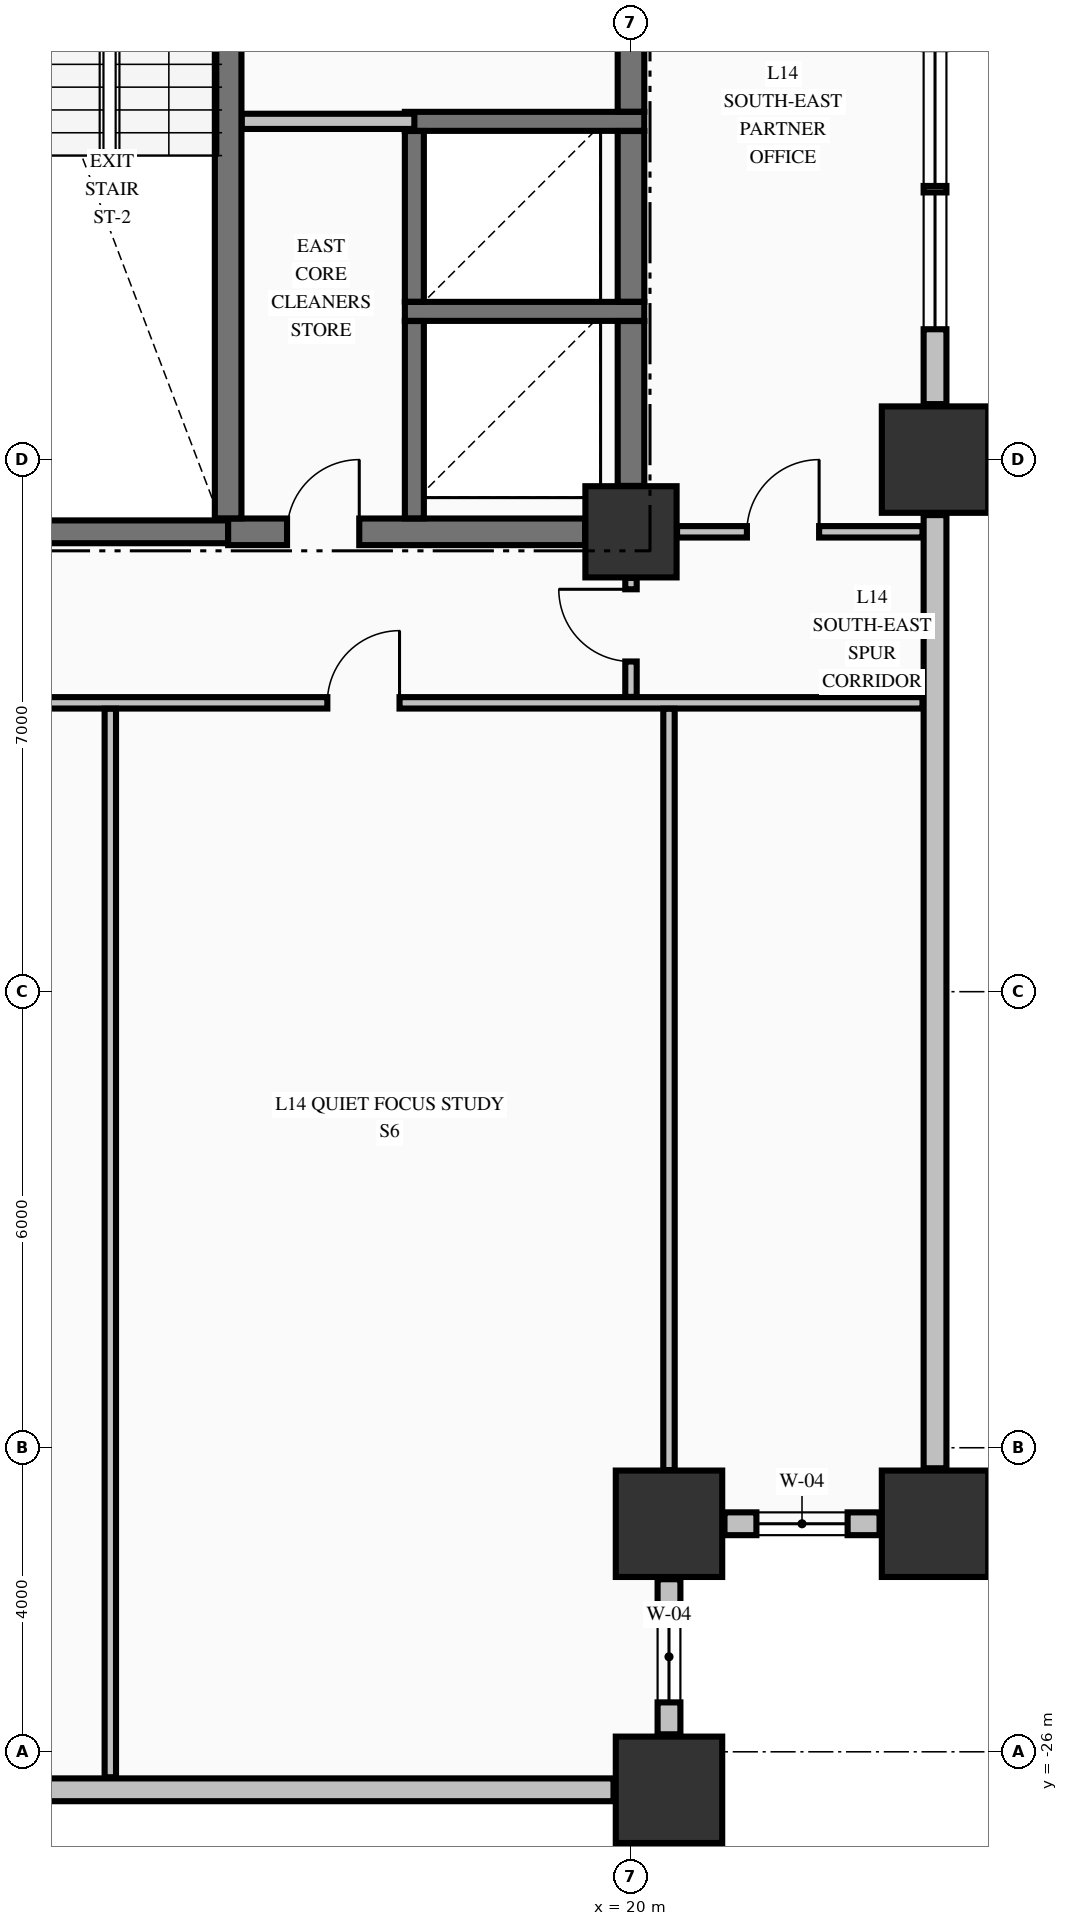
"""IFC4 building model, lengths in metres.
Left out: names, types, materials, properties, quantities, classifications, styles, units other than length and angle.
Written with IfcOpenShell. Run it as: python <this file> out.ifc"""

import sys

from ifc_helpers import new_model, si_unit, direction, frame, frame_2d, origin, origin_2d, place, context, subcontext, project, spatial, rectangle, extrude, element, fill, save


model = new_model("IFC4")
c1 = context("Model", 3, precision=1e-05, world=origin(), true_north=direction((0.0, 1.0)))
c2 = subcontext(c1, "Body", "Model", "MODEL_VIEW")
j1 = project(units=[si_unit("LENGTHUNIT", "METRE"), si_unit("PLANEANGLEUNIT", "RADIAN")], contexts=[c1])
p1 = place(None, origin())
s1 = spatial("IfcSite", under=j1, at=p1, CompositionType="ELEMENT")
p2 = place(p1, origin())
s2 = spatial("IfcBuilding", under=s1, at=p2, CompositionType="ELEMENT")
p3 = place(p2, frame((0.0, 0.0, 60.76)))
s3 = spatial("IfcBuildingStorey", under=s2, at=p3, CompositionType="ELEMENT", Elevation=60.76)
for number, where, z_axis, x_axis in (
    (1, (20.5, -26.5, -0.3), (0.0, 0.0, 1.0), (1.0, 0.0, 0.0)),
    (2, (24.0, -23.0, -0.3), (0.0, 0.0, 1.0), (1.0, 0.0, 0.0)),
    (3, (24.0, -9.0, -0.3), (0.0, 0.0, 1.0), (1.0, 0.0, 0.0)),
    (4, (20.5, -23.0, -0.3), (0.0, 0.0, 1.0), (1.0, 0.0, 0.0)),
):
    element("IfcColumn", number, at=place(p3, frame(where, z_axis=z_axis, x_axis=x_axis)), inside=s3, PredefinedType="COLUMN", context=c2, shape_type="SweptSolid", body=[
        extrude(rectangle(XDim=1.4, YDim=1.4, at=origin_2d()), origin(), (0.0, 0.0, 1.0), 3.62),
    ])
p4 = place(p3, frame((20.0, -9.95, -0.3), z_axis=(0.0, 0.0, 1.0), x_axis=(1.0, 0.0, 0.0)))
e5 = element("IfcColumn", 5, at=p4, inside=s3, PredefinedType="COLUMN", context=c2, shape_type="SweptSolid", body=[
    extrude(rectangle(XDim=1.2, YDim=1.2, at=origin_2d()), origin(), (0.0, 0.0, 1.0), 3.62),
])
p5 = place(p3, frame((20.5, -25.77, 0.0), z_axis=(0.0, 0.0, 1.0), x_axis=(0.0, 1.0, 0.0)))
e6 = element("IfcWall", 6, at=p5, inside=s3, PredefinedType="STANDARD", context=c2, shape_type="SweptSolid", body=[
    extrude(rectangle(XDim=2.04, YDim=0.3, at=frame_2d((1.02, 0.0))), origin(), (0.0, 0.0, 1.0), 2.712),
])
p6 = place(p5, frame((0.42, 0.0, 0.82)))
e7 = element("IfcOpeningElement", 7, at=p6, cuts=e6, PredefinedType="OPENING", context=c2, shape_type="SweptSolid", body=[
    extrude(rectangle(XDim=1.2, YDim=1.65, at=frame_2d((0.6, 0.825))), frame((0.0, 0.16, 0.0), z_axis=(0.0, -1.0, 0.0), x_axis=(1.0, 0.0, 0.0)), (0.0, 0.0, 1.0), 0.32),
])
p7 = place(p3, frame((21.23, -23.0, 0.0), z_axis=(0.0, 0.0, 1.0), x_axis=(1.0, 0.0, 0.0)))
e8 = element("IfcWall", 8, at=p7, inside=s3, PredefinedType="STANDARD", context=c2, shape_type="SweptSolid", body=[
    extrude(rectangle(XDim=2.04, YDim=0.3, at=frame_2d((1.02, 0.0))), origin(), (0.0, 0.0, 1.0), 2.712),
])
p8 = place(p7, frame((0.42, 0.0, 0.82)))
e9 = element("IfcOpeningElement", 9, at=p8, cuts=e8, PredefinedType="OPENING", context=c2, shape_type="SweptSolid", body=[
    extrude(rectangle(XDim=1.2, YDim=1.65, at=frame_2d((0.6, 0.825))), frame((0.0, 0.16, 0.0), z_axis=(0.0, -1.0, 0.0), x_axis=(1.0, 0.0, 0.0)), (0.0, 0.0, 1.0), 0.32),
])
p9 = place(p3, frame((11.73, -26.5, 0.0), z_axis=(0.0, 0.0, 1.0), x_axis=(1.0, 0.0, 0.0)))
e10 = element("IfcWall", 10, at=p9, inside=s3, PredefinedType="STANDARD", context=c2, shape_type="SweptSolid", body=[
    extrude(rectangle(XDim=8.04, YDim=0.3, at=frame_2d((4.02, 0.0))), origin(), (0.0, 0.0, 1.0), 2.712),
])
p10 = place(p3, frame((24.0, -22.27, 0.0), z_axis=(0.0, 0.0, 1.0), x_axis=(0.0, 1.0, 0.0)))
e11 = element("IfcWall", 11, at=p10, inside=s3, PredefinedType="STANDARD", context=c2, shape_type="SweptSolid", body=[
    extrude(rectangle(XDim=12.54, YDim=0.3, at=frame_2d((6.27, 0.0))), origin(), (0.0, 0.0, 1.0), 2.712),
])
p11 = place(p3, frame((24.0, -8.27, 0.0), z_axis=(0.0, 0.0, 1.0), x_axis=(0.0, 1.0, 0.0)))
e12 = element("IfcWall", 12, at=p11, inside=s3, PredefinedType="STANDARD", context=c2, shape_type="SweptSolid", body=[
    extrude(rectangle(XDim=7.54, YDim=0.3, at=frame_2d((3.77, 0.0))), origin(), (0.0, 0.0, 1.0), 2.712),
])
p12 = place(p11, frame((0.985, 0.0, 0.78)))
e13 = element("IfcOpeningElement", 13, at=p12, cuts=e12, PredefinedType="OPENING", context=c2, shape_type="SweptSolid", body=[
    extrude(rectangle(XDim=1.8, YDim=1.72, at=frame_2d((0.9, 0.86))), frame((0.0, 0.16, 0.0), z_axis=(0.0, -1.0, 0.0), x_axis=(1.0, 0.0, 0.0)), (0.0, 0.0, 1.0), 0.32),
])
p13 = place(p11, frame((2.87, 0.0, 0.78)))
e14 = element("IfcOpeningElement", 14, at=p13, cuts=e12, PredefinedType="OPENING", context=c2, shape_type="SweptSolid", body=[
    extrude(rectangle(XDim=1.8, YDim=1.72, at=frame_2d((0.9, 0.86))), frame((0.0, 0.16, 0.0), z_axis=(0.0, -1.0, 0.0), x_axis=(1.0, 0.0, 0.0)), (0.0, 0.0, 1.0), 0.32),
])
p14 = place(p11, frame((4.755, 0.0, 0.78)))
e15 = element("IfcOpeningElement", 15, at=p14, cuts=e12, PredefinedType="OPENING", context=c2, shape_type="SweptSolid", body=[
    extrude(rectangle(XDim=1.8, YDim=1.72, at=frame_2d((0.9, 0.86))), frame((0.0, 0.16, 0.0), z_axis=(0.0, -1.0, 0.0), x_axis=(1.0, 0.0, 0.0)), (0.0, 0.0, 1.0), 0.32),
])
p15 = place(p3, frame((11.604, -9.95, 0.0), z_axis=(0.0, 0.0, 1.0), x_axis=(1.0, 0.0, 0.0)))
e16 = element("IfcWall", 16, at=p15, inside=s3, PredefinedType="SHEAR", context=c2, shape_type="SweptSolid", body=[
    extrude(rectangle(XDim=3.096, YDim=0.3, at=frame_2d((1.548, 0.0))), origin(), (0.0, 0.0, 1.0), 3.32),
])
p16 = place(p3, frame((14.7, -9.95, 0.0), z_axis=(0.0, 0.0, 1.0), x_axis=(1.0, 0.0, 0.0)))
e17 = element("IfcWall", 17, at=p16, inside=s3, PredefinedType="SHEAR", context=c2, shape_type="SweptSolid", body=[
    extrude(rectangle(XDim=4.696, YDim=0.35, at=frame_2d((2.348, 0.0))), origin(), (0.0, 0.0, 1.0), 3.32),
])
p17 = place(p16, frame((0.775, 0.0, 0.0)))
e18 = element("IfcOpeningElement", 18, at=p17, cuts=e17, PredefinedType="OPENING", context=c2, shape_type="SweptSolid", body=[
    extrude(rectangle(XDim=0.95, YDim=2.15, at=frame_2d((0.475, 1.075))), frame((0.0, 0.185, 0.0), z_axis=(0.0, -1.0, 0.0), x_axis=(1.0, 0.0, 0.0)), (0.0, 0.0, 1.0), 0.37),
])
for number, where, z_axis, x_axis in (
    (19, (17.025, -7.05, 0.0), (0.0, 0.0, 1.0), (1.0, 0.0, 0.0)),
    (20, (17.025, -4.55, 0.0), (0.0, 0.0, 1.0), (1.0, 0.0, 0.0)),
):
    element("IfcWall", number, at=place(p3, frame(where, z_axis=z_axis, x_axis=x_axis)), inside=s3, PredefinedType="SOLIDWALL", context=c2, shape_type="SweptSolid", body=[
        extrude(rectangle(XDim=3.15, YDim=0.25, at=frame_2d((1.575, 0.0))), origin(), (0.0, 0.0, 1.0), 3.32),
    ])
p18 = place(p3, frame((-28.835, -12.2, 0.0), z_axis=(0.0, 0.0, 1.0), x_axis=(1.0, 0.0, 0.0)))
e21 = element("IfcWall", 21, at=p18, inside=s3, PredefinedType="PARTITIONING", context=c2, shape_type="SweptSolid", body=[
    extrude(rectangle(XDim=52.67, YDim=0.15, at=frame_2d((26.335, 0.0))), origin(), (0.0, 0.0, 1.0), 3.32),
])
p19 = place(p18, frame((10.99, 0.0, 0.0)))
e22 = element("IfcOpeningElement", 22, at=p19, cuts=e21, PredefinedType="OPENING", context=c2, shape_type="SweptSolid", body=[
    extrude(rectangle(XDim=1.05, YDim=2.15, at=frame_2d((0.525, 1.075))), frame((0.0, 0.085, 0.0), z_axis=(0.0, -1.0, 0.0), x_axis=(1.0, 0.0, 0.0)), (0.0, 0.0, 1.0), 0.17),
])
p20 = place(p18, frame((18.86, 0.0, 0.0)))
e23 = element("IfcOpeningElement", 23, at=p20, cuts=e21, PredefinedType="OPENING", context=c2, shape_type="SweptSolid", body=[
    extrude(rectangle(XDim=0.95, YDim=2.15, at=frame_2d((0.475, 1.075))), frame((0.0, 0.085, 0.0), z_axis=(0.0, -1.0, 0.0), x_axis=(1.0, 0.0, 0.0)), (0.0, 0.0, 1.0), 0.17),
])
p21 = place(p18, frame((23.21, 0.0, 0.0)))
e24 = element("IfcOpeningElement", 24, at=p21, cuts=e21, PredefinedType="OPENING", context=c2, shape_type="SweptSolid", body=[
    extrude(rectangle(XDim=0.95, YDim=2.15, at=frame_2d((0.475, 1.075))), frame((0.0, 0.085, 0.0), z_axis=(0.0, -1.0, 0.0), x_axis=(1.0, 0.0, 0.0)), (0.0, 0.0, 1.0), 0.17),
])
p22 = place(p18, frame((27.56, 0.0, 0.0)))
e25 = element("IfcOpeningElement", 25, at=p22, cuts=e21, PredefinedType="OPENING", context=c2, shape_type="SweptSolid", body=[
    extrude(rectangle(XDim=0.95, YDim=2.15, at=frame_2d((0.475, 1.075))), frame((0.0, 0.085, 0.0), z_axis=(0.0, -1.0, 0.0), x_axis=(1.0, 0.0, 0.0)), (0.0, 0.0, 1.0), 0.17),
])
p23 = place(p18, frame((36.86, 0.0, 0.0)))
e26 = element("IfcOpeningElement", 26, at=p23, cuts=e21, PredefinedType="OPENING", context=c2, shape_type="SweptSolid", body=[
    extrude(rectangle(XDim=1.05, YDim=2.15, at=frame_2d((0.525, 1.075))), frame((0.0, 0.085, 0.0), z_axis=(0.0, -1.0, 0.0), x_axis=(1.0, 0.0, 0.0)), (0.0, 0.0, 1.0), 0.17),
])
p24 = place(p18, frame((44.84, 0.0, 0.0)))
e27 = element("IfcOpeningElement", 27, at=p24, cuts=e21, PredefinedType="OPENING", context=c2, shape_type="SweptSolid", body=[
    extrude(rectangle(XDim=0.95, YDim=2.15, at=frame_2d((0.475, 1.075))), frame((0.0, 0.085, 0.0), z_axis=(0.0, -1.0, 0.0), x_axis=(1.0, 0.0, 0.0)), (0.0, 0.0, 1.0), 0.17),
])
p25 = place(p3, frame((20.606, -9.95, 0.0), z_axis=(0.0, 0.0, 1.0), x_axis=(1.0, 0.0, 0.0)))
e28 = element("IfcWall", 28, at=p25, inside=s3, PredefinedType="PARTITIONING", context=c2, shape_type="SweptSolid", body=[
    extrude(rectangle(XDim=3.229, YDim=0.15, at=frame_2d((1.615, 0.0))), origin(), (0.0, 0.0, 1.0), 3.32),
])
p26 = place(p25, frame((0.919, 0.0, 0.0)))
e29 = element("IfcOpeningElement", 29, at=p26, cuts=e28, PredefinedType="OPENING", context=c2, shape_type="SweptSolid", body=[
    extrude(rectangle(XDim=0.95, YDim=2.15, at=frame_2d((0.475, 1.075))), frame((0.0, 0.085, 0.0), z_axis=(0.0, -1.0, 0.0), x_axis=(1.0, 0.0, 0.0)), (0.0, 0.0, 1.0), 0.17),
])
p27 = place(p3, frame((14.878, -4.55, 0.0), z_axis=(0.0, 0.0, 1.0), x_axis=(1.0, 0.0, 0.0)))
e30 = element("IfcWall", 30, at=p27, inside=s3, PredefinedType="PARTITIONING", context=c2, shape_type="SweptSolid", body=[
    extrude(rectangle(XDim=2.272, YDim=0.2, at=frame_2d((1.136, 0.0))), origin(), (0.0, 0.0, 1.0), 3.32),
])
p28 = place(p3, frame((14.7, -9.773, 0.0), z_axis=(0.0, 0.0, 1.0), x_axis=(0.0, 1.0, 0.0)))
e31 = element("IfcWall", 31, at=p28, inside=s3, PredefinedType="SHEAR", context=c2, shape_type="SweptSolid", body=[
    extrude(rectangle(XDim=9.371, YDim=0.35, at=frame_2d((4.686, 0.0))), origin(), (0.0, 0.0, 1.0), 3.32),
])
p29 = place(p3, frame((17.15, -9.773, 0.0), z_axis=(0.0, 0.0, 1.0), x_axis=(0.0, 1.0, 0.0)))
e32 = element("IfcWall", 32, at=p29, inside=s3, PredefinedType="SOLIDWALL", context=c2, shape_type="SweptSolid", body=[
    extrude(rectangle(XDim=2.596, YDim=0.25, at=frame_2d((1.298, 0.0))), origin(), (0.0, 0.0, 1.0), 3.32),
])
p30 = place(p3, frame((17.15, -6.923, 0.0), z_axis=(0.0, 0.0, 1.0), x_axis=(0.0, 1.0, 0.0)))
e33 = element("IfcWall", 33, at=p30, inside=s3, PredefinedType="SOLIDWALL", context=c2, shape_type="SweptSolid", body=[
    extrude(rectangle(XDim=2.246, YDim=0.25, at=frame_2d((1.123, 0.0))), origin(), (0.0, 0.0, 1.0), 3.32),
])
p31 = place(p3, frame((20.0, -9.346, 0.0), z_axis=(0.0, 0.0, 1.0), x_axis=(0.0, 1.0, 0.0)))
e34 = element("IfcWall", 34, at=p31, inside=s3, PredefinedType="SHEAR", context=c2, shape_type="SweptSolid", body=[
    extrude(rectangle(XDim=2.169, YDim=0.35, at=frame_2d((1.084, 0.0))), origin(), (0.0, 0.0, 1.0), 3.32),
])
p32 = place(p3, frame((20.0, -6.923, 0.0), z_axis=(0.0, 0.0, 1.0), x_axis=(0.0, 1.0, 0.0)))
e35 = element("IfcWall", 35, at=p32, inside=s3, PredefinedType="SHEAR", context=c2, shape_type="SweptSolid", body=[
    extrude(rectangle(XDim=2.246, YDim=0.35, at=frame_2d((1.123, 0.0))), origin(), (0.0, 0.0, 1.0), 3.32),
])
p33 = place(p3, frame((20.0, -4.423, 0.0), z_axis=(0.0, 0.0, 1.0), x_axis=(0.0, 1.0, 0.0)))
e36 = element("IfcWall", 36, at=p33, inside=s3, PredefinedType="SHEAR", context=c2, shape_type="SweptSolid", body=[
    extrude(rectangle(XDim=3.819, YDim=0.35, at=frame_2d((1.91, 0.0))), origin(), (0.0, 0.0, 1.0), 3.32),
])
p34 = place(p3, frame((13.15, -26.335, 0.0), z_axis=(0.0, 0.0, 1.0), x_axis=(0.0, 1.0, 0.0)))
e37 = element("IfcWall", 37, at=p34, inside=s3, PredefinedType="PARTITIONING", context=c2, shape_type="SweptSolid", body=[
    extrude(rectangle(XDim=14.057, YDim=0.15, at=frame_2d((7.028, 0.0))), origin(), (0.0, 0.0, 1.0), 3.32),
])
p35 = place(p3, frame((20.0, -12.122, 0.0), z_axis=(0.0, 0.0, 1.0), x_axis=(0.0, 1.0, 0.0)))
e38 = element("IfcWall", 38, at=p35, inside=s3, PredefinedType="PARTITIONING", context=c2, shape_type="SweptSolid", body=[
    extrude(rectangle(XDim=1.566, YDim=0.15, at=frame_2d((0.783, 0.0))), origin(), (0.0, 0.0, 1.0), 3.32),
])
p36 = place(p35, frame((0.466, 0.0, 0.0)))
e39 = element("IfcOpeningElement", 39, at=p36, cuts=e38, PredefinedType="OPENING", context=c2, shape_type="SweptSolid", body=[
    extrude(rectangle(XDim=0.95, YDim=2.15, at=frame_2d((0.475, 1.075))), frame((0.0, 0.085, 0.0), z_axis=(0.0, -1.0, 0.0), x_axis=(1.0, 0.0, 0.0)), (0.0, 0.0, 1.0), 0.17),
])
p37 = place(p3, frame((20.5, -22.294, 0.0), z_axis=(0.0, 0.0, 1.0), x_axis=(0.0, 1.0, 0.0)))
e40 = element("IfcWall", 40, at=p37, inside=s3, PredefinedType="PARTITIONING", context=c2, shape_type="SweptSolid", body=[
    extrude(rectangle(XDim=10.016, YDim=0.15, at=frame_2d((5.008, 0.0))), origin(), (0.0, 0.0, 1.0), 3.32),
])
p38 = place(p6, origin())
e41 = element("IfcWindow", 41, at=p38, inside=s3, PartitioningType="SINGLE_PANEL", PredefinedType="WINDOW", context=c2, shape_type="SweptSolid", body=[
    extrude(rectangle(XDim=1.2, YDim=1.65, at=frame_2d((0.6, 0.825))), frame((0.0, 0.03, 0.0), z_axis=(0.0, -1.0, 0.0), x_axis=(1.0, 0.0, 0.0)), (0.0, 0.0, 1.0), 0.06),
])
fill(e7, e41)
p39 = place(p8, origin())
e42 = element("IfcWindow", 42, at=p39, inside=s3, PartitioningType="SINGLE_PANEL", PredefinedType="WINDOW", context=c2, shape_type="SweptSolid", body=[
    extrude(rectangle(XDim=1.2, YDim=1.65, at=frame_2d((0.6, 0.825))), frame((0.0, 0.03, 0.0), z_axis=(0.0, -1.0, 0.0), x_axis=(1.0, 0.0, 0.0)), (0.0, 0.0, 1.0), 0.06),
])
fill(e9, e42)
p40 = place(p12, origin())
e43 = element("IfcWindow", 43, at=p40, inside=s3, PartitioningType="SINGLE_PANEL", PredefinedType="WINDOW", context=c2, shape_type="SweptSolid", body=[
    extrude(rectangle(XDim=1.8, YDim=1.72, at=frame_2d((0.9, 0.86))), frame((0.0, 0.03, 0.0), z_axis=(0.0, -1.0, 0.0), x_axis=(1.0, 0.0, 0.0)), (0.0, 0.0, 1.0), 0.06),
])
fill(e13, e43)
p41 = place(p13, origin())
e44 = element("IfcWindow", 44, at=p41, inside=s3, PartitioningType="SINGLE_PANEL", PredefinedType="WINDOW", context=c2, shape_type="SweptSolid", body=[
    extrude(rectangle(XDim=1.8, YDim=1.72, at=frame_2d((0.9, 0.86))), frame((0.0, 0.03, 0.0), z_axis=(0.0, -1.0, 0.0), x_axis=(1.0, 0.0, 0.0)), (0.0, 0.0, 1.0), 0.06),
])
fill(e14, e44)
p42 = place(p17, origin())
e45 = element("IfcDoor", 45, at=p42, inside=s3, OperationType="SINGLE_SWING_RIGHT", PredefinedType="DOOR", context=c2, shape_type="SweptSolid", body=[
    extrude(rectangle(XDim=0.95, YDim=2.15, at=frame_2d((0.475, 1.075))), frame((0.0, 0.025, 0.0), z_axis=(0.0, -1.0, 0.0), x_axis=(1.0, 0.0, 0.0)), (0.0, 0.0, 1.0), 0.05),
])
fill(e18, e45)
p43 = place(p24, origin())
e46 = element("IfcDoor", 46, at=p43, inside=s3, OperationType="SINGLE_SWING_RIGHT", PredefinedType="DOOR", context=c2, shape_type="SweptSolid", body=[
    extrude(rectangle(XDim=0.95, YDim=2.15, at=frame_2d((0.475, 1.075))), frame((0.0, 0.025, 0.0), z_axis=(0.0, -1.0, 0.0), x_axis=(1.0, 0.0, 0.0)), (0.0, 0.0, 1.0), 0.05),
])
fill(e27, e46)
p44 = place(p36, origin())
e47 = element("IfcDoor", 47, at=p44, inside=s3, OperationType="SINGLE_SWING_RIGHT", PredefinedType="DOOR", context=c2, shape_type="SweptSolid", body=[
    extrude(rectangle(XDim=0.95, YDim=2.15, at=frame_2d((0.475, 1.075))), frame((0.0, 0.025, 0.0), z_axis=(0.0, -1.0, 0.0), x_axis=(1.0, 0.0, 0.0)), (0.0, 0.0, 1.0), 0.05),
])
fill(e39, e47)
p45 = place(p26, origin())
e48 = element("IfcDoor", 48, at=p45, inside=s3, OperationType="SINGLE_SWING_RIGHT", PredefinedType="DOOR", context=c2, shape_type="SweptSolid", body=[
    extrude(rectangle(XDim=0.95, YDim=2.15, at=frame_2d((0.475, 1.075))), frame((0.0, 0.025, 0.0), z_axis=(0.0, -1.0, 0.0), x_axis=(1.0, 0.0, 0.0)), (0.0, 0.0, 1.0), 0.05),
])
fill(e29, e48)
save(model, sys.argv[1])
